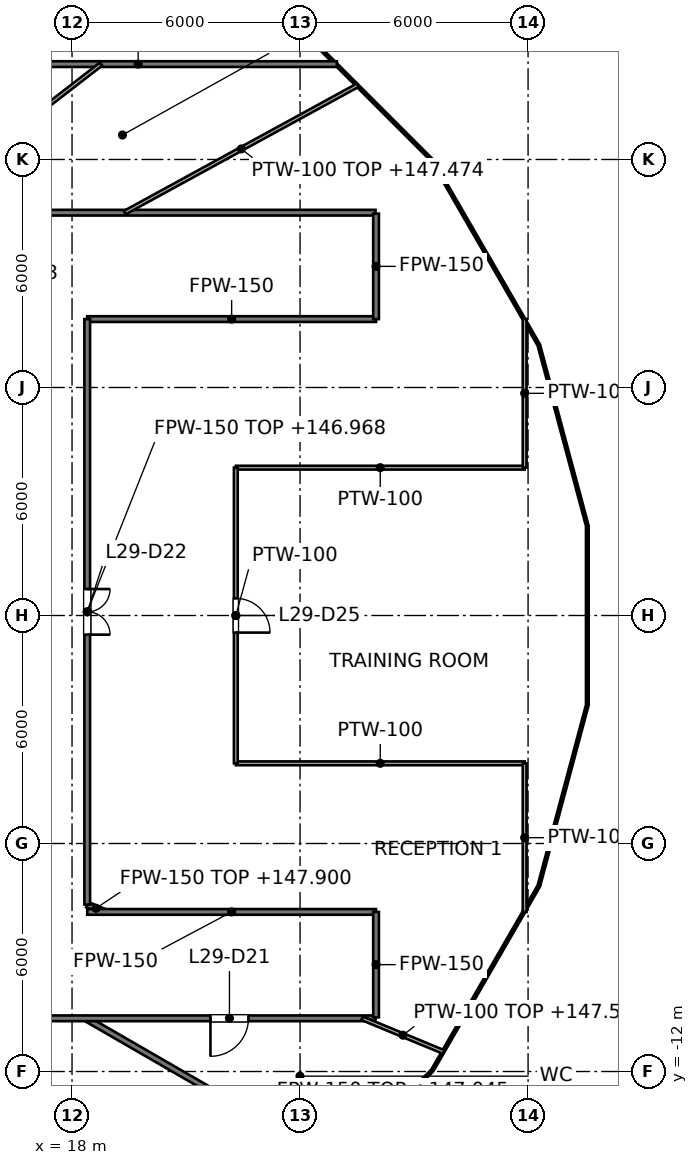
"""IFC4 building model, lengths in metres.
Left out: names, types, materials, properties, quantities, classifications, styles, units other than length and angle.
Written with IfcOpenShell. Run it as: python <this file> out.ifc"""

import sys

from ifc_helpers import new_model, si_unit, direction, frame, frame_2d, origin, place, context, subcontext, project, spatial, rectangle, extrude, element, fill, save


model = new_model("IFC4")
c1 = context("Model", 3, precision=1e-05, world=origin(), true_north=direction((0.0, 1.0)))
c2 = subcontext(c1, "Body", "Model", "MODEL_VIEW")
j1 = project(units=[si_unit("LENGTHUNIT", "METRE"), si_unit("PLANEANGLEUNIT", "RADIAN")], contexts=[c1])
p1 = place(None, origin())
s1 = spatial("IfcSite", under=j1, at=p1, CompositionType="ELEMENT")
p2 = place(p1, origin())
s2 = spatial("IfcBuilding", under=s1, at=p2, CompositionType="ELEMENT")
p3 = place(p2, frame((0.0, 0.0, 144.0)))
s3 = spatial("IfcBuildingStorey", under=s2, at=p3, CompositionType="ELEMENT", Elevation=144.0)
p4 = place(p3, frame((18.359, -10.6, 0.0), z_axis=(0.0, 0.0, 1.0), x_axis=(0.866036201792, -0.499981296836, 0.0)))
e1 = element("IfcWall", 1, at=p4, inside=s3, PredefinedType="PARTITIONING", context=c2, shape_type="SweptSolid", body=[
    extrude(rectangle(XDim=7.702, YDim=0.15, at=frame_2d((3.851, 0.0))), origin(), (0.0, 0.0, 1.0), 3.045),
])
p5 = place(p3, frame((18.4, -7.608, 0.0), z_axis=(0.0, 0.0, 1.0), x_axis=(0.923666464005, -0.383197420755, 0.0)))
e2 = element("IfcWall", 2, at=p5, inside=s3, PredefinedType="PARTITIONING", context=c2, shape_type="SweptSolid", body=[
    extrude(rectangle(XDim=0.501, YDim=0.15, at=frame_2d((0.251, 0.0))), origin(), (0.0, 0.0, 1.0), 3.9),
])
p6 = place(p3, frame((-25.986, -10.6, 0.0), z_axis=(0.0, 0.0, 1.0), x_axis=(1.0, 0.0, 0.0)))
e3 = element("IfcWall", 3, at=p6, inside=s3, PredefinedType="PARTITIONING", context=c2, shape_type="SweptSolid", body=[
    extrude(rectangle(XDim=51.972, YDim=0.15, at=frame_2d((25.986, 0.0))), origin(), (0.0, 0.0, 1.0), 2.968),
])
p7 = place(p6, frame((47.628, 0.0, 0.0)))
e4 = element("IfcOpeningElement", 4, at=p7, cuts=e3, PredefinedType="OPENING", context=c2, shape_type="SweptSolid", body=[
    extrude(rectangle(XDim=1.0, YDim=2.1, at=frame_2d((0.5, 1.05))), frame((0.0, 0.075, 0.0), z_axis=(0.0, -1.0, 0.0), x_axis=(1.0, 0.0, 0.0)), (0.0, 0.0, 1.0), 0.15),
])
p8 = place(p6, frame((5.312, 0.0, 0.0)))
e5 = element("IfcOpeningElement", 5, at=p8, cuts=e3, PredefinedType="OPENING", context=c2, shape_type="SweptSolid", body=[
    extrude(rectangle(XDim=1.0, YDim=2.1, at=frame_2d((0.5, 1.05))), frame((0.0, 0.075, 0.0), z_axis=(0.0, -1.0, 0.0), x_axis=(1.0, 0.0, 0.0)), (0.0, 0.0, 1.0), 0.15),
])
p9 = place(p6, frame((14.924, 0.0, 0.0)))
e6 = element("IfcOpeningElement", 6, at=p9, cuts=e3, PredefinedType="OPENING", context=c2, shape_type="SweptSolid", body=[
    extrude(rectangle(XDim=1.0, YDim=2.1, at=frame_2d((0.5, 1.05))), frame((0.0, 0.075, 0.0), z_axis=(0.0, -1.0, 0.0), x_axis=(1.0, 0.0, 0.0)), (0.0, 0.0, 1.0), 0.15),
])
p10 = place(p6, frame((22.156, 0.0, 0.0)))
e7 = element("IfcOpeningElement", 7, at=p10, cuts=e3, PredefinedType="OPENING", context=c2, shape_type="SweptSolid", body=[
    extrude(rectangle(XDim=1.0, YDim=2.1, at=frame_2d((0.5, 1.05))), frame((0.0, 0.075, 0.0), z_axis=(0.0, -1.0, 0.0), x_axis=(1.0, 0.0, 0.0)), (0.0, 0.0, 1.0), 0.15),
])
p11 = place(p6, frame((27.795, 0.0, 0.0)))
e8 = element("IfcOpeningElement", 8, at=p11, cuts=e3, PredefinedType="OPENING", context=c2, shape_type="SweptSolid", body=[
    extrude(rectangle(XDim=1.0, YDim=2.1, at=frame_2d((0.5, 1.05))), frame((0.0, 0.075, 0.0), z_axis=(0.0, -1.0, 0.0), x_axis=(1.0, 0.0, 0.0)), (0.0, 0.0, 1.0), 0.15),
])
p12 = place(p6, frame((37.045, 0.0, 0.0)))
e9 = element("IfcOpeningElement", 9, at=p12, cuts=e3, PredefinedType="OPENING", context=c2, shape_type="SweptSolid", body=[
    extrude(rectangle(XDim=1.0, YDim=2.1, at=frame_2d((0.5, 1.05))), frame((0.0, 0.075, 0.0), z_axis=(0.0, -1.0, 0.0), x_axis=(1.0, 0.0, 0.0)), (0.0, 0.0, 1.0), 0.15),
])
for number, where, z_axis, x_axis in (
    (10, (18.4, -7.8, 0.0), (0.0, 0.0, 1.0), (1.0, 0.0, 0.0)),
    (11, (18.4, 7.8, 0.0), (0.0, 0.0, 1.0), (1.0, 0.0, 0.0)),
):
    element("IfcWall", number, at=place(p3, frame(where, z_axis=z_axis, x_axis=x_axis)), inside=s3, PredefinedType="PARTITIONING", context=c2, shape_type="SweptSolid", body=[
        extrude(rectangle(XDim=7.6, YDim=0.15, at=frame_2d((3.8, 0.0))), origin(), (0.0, 0.0, 1.0), 2.977),
    ])
p13 = place(p3, frame((-25.986, 10.6, 0.0), z_axis=(0.0, 0.0, 1.0), x_axis=(1.0, 0.0, 0.0)))
e12 = element("IfcWall", 12, at=p13, inside=s3, PredefinedType="PARTITIONING", context=c2, shape_type="SweptSolid", body=[
    extrude(rectangle(XDim=51.972, YDim=0.15, at=frame_2d((25.986, 0.0))), origin(), (0.0, 0.0, 1.0), 2.968),
])
p14 = place(p13, frame((42.031, 0.0, 0.0)))
e13 = element("IfcOpeningElement", 13, at=p14, cuts=e12, PredefinedType="OPENING", context=c2, shape_type="SweptSolid", body=[
    extrude(rectangle(XDim=1.0, YDim=2.1, at=frame_2d((0.5, 1.05))), frame((0.0, 0.075, 0.0), z_axis=(0.0, -1.0, 0.0), x_axis=(1.0, 0.0, 0.0)), (0.0, 0.0, 1.0), 0.15),
])
p15 = place(p13, frame((37.69, 0.0, 0.0)))
e14 = element("IfcOpeningElement", 14, at=p15, cuts=e12, PredefinedType="OPENING", context=c2, shape_type="SweptSolid", body=[
    extrude(rectangle(XDim=1.0, YDim=2.1, at=frame_2d((0.5, 1.05))), frame((0.0, 0.075, 0.0), z_axis=(0.0, -1.0, 0.0), x_axis=(1.0, 0.0, 0.0)), (0.0, 0.0, 1.0), 0.15),
])
p16 = place(p13, frame((32.156, 0.0, 0.0)))
e15 = element("IfcOpeningElement", 15, at=p16, cuts=e12, PredefinedType="OPENING", context=c2, shape_type="SweptSolid", body=[
    extrude(rectangle(XDim=1.0, YDim=2.1, at=frame_2d((0.5, 1.05))), frame((0.0, 0.075, 0.0), z_axis=(0.0, -1.0, 0.0), x_axis=(1.0, 0.0, 0.0)), (0.0, 0.0, 1.0), 0.15),
])
p17 = place(p13, frame((23.896, 0.0, 0.0)))
e16 = element("IfcOpeningElement", 16, at=p17, cuts=e12, PredefinedType="OPENING", context=c2, shape_type="SweptSolid", body=[
    extrude(rectangle(XDim=1.0, YDim=2.1, at=frame_2d((0.5, 1.05))), frame((0.0, 0.075, 0.0), z_axis=(0.0, -1.0, 0.0), x_axis=(1.0, 0.0, 0.0)), (0.0, 0.0, 1.0), 0.15),
])
p18 = place(p13, frame((13.126, 0.0, 0.0)))
e17 = element("IfcOpeningElement", 17, at=p18, cuts=e12, PredefinedType="OPENING", context=c2, shape_type="SweptSolid", body=[
    extrude(rectangle(XDim=1.2, YDim=2.1, at=frame_2d((0.6, 1.05))), frame((0.0, 0.075, 0.0), z_axis=(0.0, -1.0, 0.0), x_axis=(1.0, 0.0, 0.0)), (0.0, 0.0, 1.0), 0.15),
])
p19 = place(p3, frame((14.51, 14.51, 0.0), z_axis=(0.0, 0.0, 1.0), x_axis=(1.0, 0.0, 0.0)))
e18 = element("IfcWall", 18, at=p19, inside=s3, PredefinedType="PARTITIONING", context=c2, shape_type="SweptSolid", body=[
    extrude(rectangle(XDim=10.46, YDim=0.15, at=frame_2d((5.23, 0.0))), origin(), (0.0, 0.0, 1.0), 2.968),
])
for number, where, z_axis, x_axis in (
    (19, (26.0, -10.575, 0.0), (0.0, 0.0, 1.0), (0.0, 1.0, 0.0)),
    (20, (26.0, 7.8, 0.0), (0.0, 0.0, 1.0), (0.0, 1.0, 0.0)),
):
    element("IfcWall", number, at=place(p3, frame(where, z_axis=z_axis, x_axis=x_axis)), inside=s3, PredefinedType="PARTITIONING", context=c2, shape_type="SweptSolid", body=[
        extrude(rectangle(XDim=2.775, YDim=0.15, at=frame_2d((1.387, 0.0))), origin(), (0.0, 0.0, 1.0), 2.977),
    ])
p20 = place(p3, frame((18.4, -7.608, 0.0), z_axis=(0.0, 0.0, 1.0), x_axis=(0.0, 1.0, 0.0)))
e21 = element("IfcWall", 21, at=p20, inside=s3, PredefinedType="PARTITIONING", context=c2, shape_type="SweptSolid", body=[
    extrude(rectangle(XDim=15.408, YDim=0.15, at=frame_2d((7.704, 0.0))), origin(), (0.0, 0.0, 1.0), 2.968),
])
p21 = place(p20, frame((7.104, 0.0, 0.0)))
e22 = element("IfcOpeningElement", 22, at=p21, cuts=e21, PredefinedType="OPENING", context=c2, shape_type="SweptSolid", body=[
    extrude(rectangle(XDim=1.2, YDim=2.1, at=frame_2d((0.6, 1.05))), frame((0.0, 0.075, 0.0), z_axis=(0.0, -1.0, 0.0), x_axis=(1.0, 0.0, 0.0)), (0.0, 0.0, 1.0), 0.15),
])
p22 = place(p3, frame((25.635, -10.6, 0.0), z_axis=(0.0, 0.0, 1.0), x_axis=(0.924087226733, -0.382181628796, 0.0)))
e23 = element("IfcWall", 23, at=p22, inside=s3, PredefinedType="PARTITIONING", context=c2, shape_type="SweptSolid", body=[
    extrude(rectangle(XDim=2.323, YDim=0.1, at=frame_2d((1.162, 0.0))), origin(), (0.0, 0.0, 1.0), 3.525),
])
for number, where, z_axis, x_axis in (
    (24, (22.31, -3.89, 0.0), (0.0, 0.0, 1.0), (1.0, 0.0, 0.0)),
    (25, (22.31, 3.89, 0.0), (0.0, 0.0, 1.0), (1.0, 0.0, 0.0)),
):
    element("IfcWall", number, at=place(p3, frame(where, z_axis=z_axis, x_axis=x_axis)), inside=s3, PredefinedType="PARTITIONING", context=c2, shape_type="SweptSolid", body=[
        extrude(rectangle(XDim=7.6, YDim=0.1, at=frame_2d((3.8, 0.0))), origin(), (0.0, 0.0, 1.0), 2.968),
    ])
p23 = place(p3, frame((19.384, 10.6, 0.0), z_axis=(0.0, 0.0, 1.0), x_axis=(0.877388352769, 0.479780865006, 0.0)))
e26 = element("IfcWall", 26, at=p23, inside=s3, PredefinedType="PARTITIONING", context=c2, shape_type="SweptSolid", body=[
    extrude(rectangle(XDim=6.997, YDim=0.1, at=frame_2d((3.499, 0.0))), origin(), (0.0, 0.0, 1.0), 3.474),
])
p24 = place(p3, frame((13.707, 10.6, 0.0), z_axis=(0.0, 0.0, 1.0), x_axis=(0.791052244704, 0.611748597177, 0.0)))
e27 = element("IfcWall", 27, at=p24, inside=s3, PredefinedType="PARTITIONING", context=c2, shape_type="SweptSolid", body=[
    extrude(rectangle(XDim=6.391, YDim=0.1, at=frame_2d((3.196, 0.0))), origin(), (0.0, 0.0, 1.0), 3.9),
])
for number, where, z_axis, x_axis in (
    (28, (29.91, -7.803, 0.0), (0.0, 0.0, 1.0), (0.0, 1.0, 0.0)),
    (29, (29.91, 3.89, 0.0), (0.0, 0.0, 1.0), (0.0, 1.0, 0.0)),
):
    element("IfcWall", number, at=place(p3, frame(where, z_axis=z_axis, x_axis=x_axis)), inside=s3, PredefinedType="PARTITIONING", context=c2, shape_type="SweptSolid", body=[
        extrude(rectangle(XDim=3.913, YDim=0.1, at=frame_2d((1.957, 0.0))), origin(), (0.0, 0.0, 1.0), 2.968),
    ])
p25 = place(p3, frame((22.31, -3.89, 0.0), z_axis=(0.0, 0.0, 1.0), x_axis=(0.0, 1.0, 0.0)))
e30 = element("IfcWall", 30, at=p25, inside=s3, PredefinedType="PARTITIONING", context=c2, shape_type="SweptSolid", body=[
    extrude(rectangle(XDim=7.78, YDim=0.1, at=frame_2d((3.89, 0.0))), origin(), (0.0, 0.0, 1.0), 2.968),
])
p26 = place(p25, frame((3.44, 0.0, 0.0)))
e31 = element("IfcOpeningElement", 31, at=p26, cuts=e30, PredefinedType="OPENING", context=c2, shape_type="SweptSolid", body=[
    extrude(rectangle(XDim=0.9, YDim=2.1, at=frame_2d((0.45, 1.05))), frame((0.0, 0.05, 0.0), z_axis=(0.0, -1.0, 0.0), x_axis=(1.0, 0.0, 0.0)), (0.0, 0.0, 1.0), 0.1),
])
p27 = place(p7, origin())
e32 = element("IfcDoor", 32, at=p27, inside=s3, OperationType="SINGLE_SWING_LEFT", PredefinedType="DOOR", context=c2, shape_type="SweptSolid", body=[
    extrude(rectangle(XDim=1.0, YDim=2.1, at=frame_2d((0.5, 1.05))), frame((0.0, 0.025, 0.0), z_axis=(0.0, -1.0, 0.0), x_axis=(1.0, 0.0, 0.0)), (0.0, 0.0, 1.0), 0.05),
])
fill(e4, e32)
p28 = place(p21, origin())
e33 = element("IfcDoor", 33, at=p28, inside=s3, OperationType="DOUBLE_DOOR_SINGLE_SWING", PredefinedType="DOOR", context=c2, shape_type="SweptSolid", body=[
    extrude(rectangle(XDim=1.2, YDim=2.1, at=frame_2d((0.6, 1.05))), frame((0.0, 0.025, 0.0), z_axis=(0.0, -1.0, 0.0), x_axis=(1.0, 0.0, 0.0)), (0.0, 0.0, 1.0), 0.05),
])
fill(e22, e33)
p29 = place(p26, origin())
e34 = element("IfcDoor", 34, at=p29, inside=s3, OperationType="SINGLE_SWING_LEFT", PredefinedType="DOOR", context=c2, shape_type="SweptSolid", body=[
    extrude(rectangle(XDim=0.9, YDim=2.1, at=frame_2d((0.45, 1.05))), frame((0.0, 0.025, 0.0), z_axis=(0.0, -1.0, 0.0), x_axis=(1.0, 0.0, 0.0)), (0.0, 0.0, 1.0), 0.05),
])
fill(e31, e34)
save(model, sys.argv[1])
